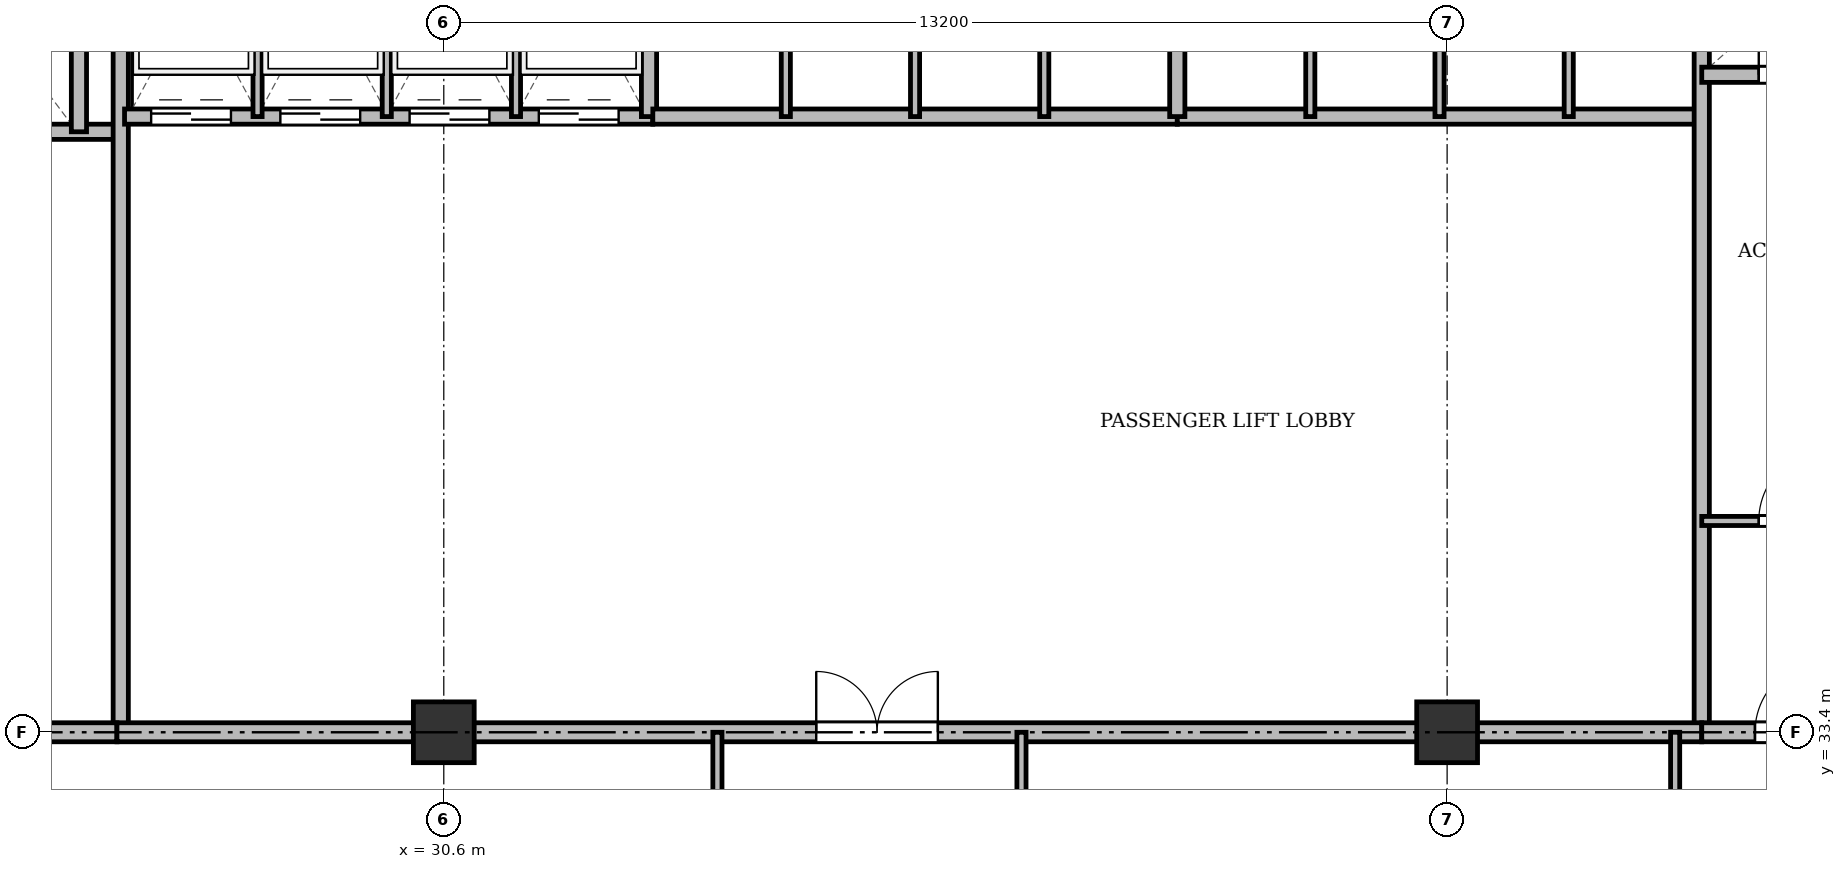
"""IFC4 building model, lengths in metres.
Left out: names, types, materials, properties, quantities, classifications, styles, units other than length and angle.
Written with IfcOpenShell. Run it as: python <this file> out.ifc"""

import sys

from ifc_helpers import new_model, si_unit, direction, frame, frame_2d, origin, origin_2d, place, context, subcontext, project, spatial, rectangle, extrude, source, transform, mapped, element, fill, save


model = new_model("IFC4")
c1 = context("Model", 3, precision=1e-05, world=origin(), true_north=direction((0.0, 1.0)))
c2 = subcontext(c1, "Body", "Model", "MODEL_VIEW")
j1 = project(units=[si_unit("LENGTHUNIT", "METRE"), si_unit("PLANEANGLEUNIT", "RADIAN")], contexts=[c1])
p1 = place(None, origin())
s1 = spatial("IfcSite", under=j1, at=p1, CompositionType="ELEMENT")
p2 = place(p1, origin())
s2 = spatial("IfcBuilding", under=s1, at=p2, CompositionType="ELEMENT")
p3 = place(p2, frame((0.0, 0.0, 85.3)))
s3 = spatial("IfcBuildingStorey", under=s2, at=p3, CompositionType="ELEMENT", Elevation=85.3)
m1 = source(origin(), c2, "Body", "SweptSolid", [
    extrude(rectangle(XDim=0.8, YDim=0.8, at=origin_2d()), origin(), (0.0, 0.0, 1.0), 3.6),
])
for number, where, z_axis, x_axis in (
    (1, (30.6, 33.4, 0.0), (0.0, 0.0, 1.0), (1.0, 0.0, 0.0)),
    (2, (43.8, 33.4, 0.0), (0.0, 0.0, 1.0), (1.0, 0.0, 0.0)),
):
    element("IfcColumn", number, at=place(p3, frame(where, z_axis=z_axis, x_axis=x_axis)), inside=s3, PredefinedType="COLUMN", context=c2, shape_type="MappedRepresentation", body=[
        mapped(m1, transform((0.0, 0.0, 0.0), x_axis=(1.0, 0.0, 0.0), y_axis=(0.0, 1.0, 0.0), z_axis=(0.0, 0.0, 1.0), scale=1.0)),
    ])
p4 = place(p3, frame((19.55, 41.3, 0.0), z_axis=(0.0, 0.0, 1.0), x_axis=(1.0, 0.0, 0.0)))
e3 = element("IfcWall", 3, at=p4, inside=s3, PredefinedType="SOLIDWALL", context=c2, shape_type="SweptSolid", body=[
    extrude(rectangle(XDim=6.75, YDim=0.2, at=frame_2d((3.375, 0.0))), origin(), (0.0, 0.0, 1.0), 3.34),
])
p5 = place(p4, frame((1.7, 0.0, 0.0)))
e4 = element("IfcOpeningElement", 4, at=p5, cuts=e3, PredefinedType="OPENING", context=c2, shape_type="SweptSolid", body=[
    extrude(rectangle(XDim=1.1, YDim=2.15, at=frame_2d((0.55, 1.075))), frame((0.0, 0.11, 0.0), z_axis=(0.0, -1.0, 0.0), x_axis=(1.0, 0.0, 0.0)), (0.0, 0.0, 1.0), 0.22),
])
p6 = place(p4, frame((4.4, 0.0, 0.0)))
e5 = element("IfcOpeningElement", 5, at=p6, cuts=e3, PredefinedType="OPENING", context=c2, shape_type="SweptSolid", body=[
    extrude(rectangle(XDim=1.1, YDim=2.15, at=frame_2d((0.55, 1.075))), frame((0.0, 0.11, 0.0), z_axis=(0.0, -1.0, 0.0), x_axis=(1.0, 0.0, 0.0)), (0.0, 0.0, 1.0), 0.22),
])
p7 = place(p3, frame((25.8, 41.3, 0.0), z_axis=(0.0, 0.0, 1.0), x_axis=(0.0, 1.0, 0.0)))
e6 = element("IfcWall", 6, at=p7, inside=s3, PredefinedType="SOLIDWALL", context=c2, shape_type="SweptSolid", body=[
    extrude(rectangle(XDim=3.4, YDim=0.2, at=frame_2d((1.7, 0.0))), origin(), (0.0, 0.0, 1.0), 3.34),
])
p8 = place(p3, frame((26.35, 33.4, 0.0), z_axis=(0.0, 0.0, 1.0), x_axis=(0.0, 1.0, 0.0)))
e7 = element("IfcWall", 7, at=p8, inside=s3, PredefinedType="SOLIDWALL", context=c2, shape_type="SweptSolid", body=[
    extrude(rectangle(XDim=11.3, YDim=0.2, at=frame_2d((5.65, 0.0))), origin(), (0.0, 0.0, 1.0), 2.752),
])
p9 = place(p3, frame((19.5, 33.4, 0.0), z_axis=(0.0, 0.0, 1.0), x_axis=(1.0, 0.0, 0.0)))
e8 = element("IfcWall", 8, at=p9, inside=s3, PredefinedType="PARTITIONING", context=c2, shape_type="SweptSolid", body=[
    extrude(rectangle(XDim=6.8, YDim=0.25, at=frame_2d((3.4, 0.0))), origin(), (0.0, 0.0, 1.0), 2.752),
])
p10 = place(p9, frame((0.75, 0.0, 0.0)))
e9 = element("IfcOpeningElement", 9, at=p10, cuts=e8, PredefinedType="OPENING", context=c2, shape_type="SweptSolid", body=[
    extrude(rectangle(XDim=1.6, YDim=2.2, at=frame_2d((0.8, 1.1))), frame((0.0, 0.135, 0.0), z_axis=(0.0, -1.0, 0.0), x_axis=(1.0, 0.0, 0.0)), (0.0, 0.0, 1.0), 0.27),
])
p11 = place(p3, frame((26.4, 41.5, 0.0), z_axis=(0.0, 0.0, 1.0), x_axis=(1.0, 0.0, 0.0)))
e10 = element("IfcWall", 10, at=p11, inside=s3, PredefinedType="SOLIDWALL", context=c2, shape_type="SweptSolid", body=[
    extrude(rectangle(XDim=6.95, YDim=0.2, at=frame_2d((3.475, 0.0))), origin(), (0.0, 0.0, 1.0), 3.34),
])
p12 = place(p11, frame((0.35, 0.0, 0.0)))
e11 = element("IfcOpeningElement", 11, at=p12, cuts=e10, PredefinedType="OPENING", context=c2, shape_type="SweptSolid", body=[
    extrude(rectangle(XDim=1.05, YDim=2.15, at=frame_2d((0.525, 1.075))), frame((0.0, 0.11, 0.0), z_axis=(0.0, -1.0, 0.0), x_axis=(1.0, 0.0, 0.0)), (0.0, 0.0, 1.0), 0.22),
])
p13 = place(p11, frame((2.05, 0.0, 0.0)))
e12 = element("IfcOpeningElement", 12, at=p13, cuts=e10, PredefinedType="OPENING", context=c2, shape_type="SweptSolid", body=[
    extrude(rectangle(XDim=1.05, YDim=2.15, at=frame_2d((0.525, 1.075))), frame((0.0, 0.11, 0.0), z_axis=(0.0, -1.0, 0.0), x_axis=(1.0, 0.0, 0.0)), (0.0, 0.0, 1.0), 0.22),
])
p14 = place(p11, frame((3.75, 0.0, 0.0)))
e13 = element("IfcOpeningElement", 13, at=p14, cuts=e10, PredefinedType="OPENING", context=c2, shape_type="SweptSolid", body=[
    extrude(rectangle(XDim=1.05, YDim=2.15, at=frame_2d((0.525, 1.075))), frame((0.0, 0.11, 0.0), z_axis=(0.0, -1.0, 0.0), x_axis=(1.0, 0.0, 0.0)), (0.0, 0.0, 1.0), 0.22),
])
p15 = place(p11, frame((5.45, 0.0, 0.0)))
e14 = element("IfcOpeningElement", 14, at=p15, cuts=e10, PredefinedType="OPENING", context=c2, shape_type="SweptSolid", body=[
    extrude(rectangle(XDim=1.05, YDim=2.15, at=frame_2d((0.525, 1.075))), frame((0.0, 0.11, 0.0), z_axis=(0.0, -1.0, 0.0), x_axis=(1.0, 0.0, 0.0)), (0.0, 0.0, 1.0), 0.22),
])
p16 = place(p3, frame((33.3, 41.5, 0.0), z_axis=(0.0, 0.0, 1.0), x_axis=(0.0, 1.0, 0.0)))
e15 = element("IfcWall", 15, at=p16, inside=s3, PredefinedType="SOLIDWALL", context=c2, shape_type="SweptSolid", body=[
    extrude(rectangle(XDim=3.2, YDim=0.2, at=frame_2d((1.6, 0.0))), origin(), (0.0, 0.0, 1.0), 3.34),
])
for number, where, z_axis, x_axis in (
    (16, (28.15, 41.5, 0.0), (0.0, 0.0, 1.0), (0.0, 1.0, 0.0)),
    (17, (29.85, 41.5, 0.0), (0.0, 0.0, 1.0), (0.0, 1.0, 0.0)),
    (18, (31.55, 41.5, 0.0), (0.0, 0.0, 1.0), (0.0, 1.0, 0.0)),
):
    element("IfcWall", number, at=place(p3, frame(where, z_axis=z_axis, x_axis=x_axis)), inside=s3, PredefinedType="PARTITIONING", context=c2, shape_type="SweptSolid", body=[
        extrude(rectangle(XDim=3.2, YDim=0.12, at=frame_2d((1.6, 0.0))), origin(), (0.0, 0.0, 1.0), 3.34),
    ])
p17 = place(p3, frame((33.35, 41.5, 0.0), z_axis=(0.0, 0.0, 1.0), x_axis=(1.0, 0.0, 0.0)))
e19 = element("IfcWall", 19, at=p17, inside=s3, PredefinedType="SOLIDWALL", context=c2, shape_type="SweptSolid", body=[
    extrude(rectangle(XDim=6.9, YDim=0.2, at=frame_2d((3.45, 0.0))), origin(), (0.0, 0.0, 1.0), 3.34),
])
for number, where, z_axis, x_axis in (
    (20, (35.1, 41.5, 0.0), (0.0, 0.0, 1.0), (0.0, 1.0, 0.0)),
    (21, (36.8, 41.5, 0.0), (0.0, 0.0, 1.0), (0.0, 1.0, 0.0)),
    (22, (38.5, 41.5, 0.0), (0.0, 0.0, 1.0), (0.0, 1.0, 0.0)),
):
    element("IfcWall", number, at=place(p3, frame(where, z_axis=z_axis, x_axis=x_axis)), inside=s3, PredefinedType="PARTITIONING", context=c2, shape_type="SweptSolid", body=[
        extrude(rectangle(XDim=3.2, YDim=0.12, at=frame_2d((1.6, 0.0))), origin(), (0.0, 0.0, 1.0), 3.34),
    ])
p18 = place(p3, frame((40.25, 41.5, 0.0), z_axis=(0.0, 0.0, 1.0), x_axis=(1.0, 0.0, 0.0)))
e23 = element("IfcWall", 23, at=p18, inside=s3, PredefinedType="SOLIDWALL", context=c2, shape_type="SweptSolid", body=[
    extrude(rectangle(XDim=6.9, YDim=0.2, at=frame_2d((3.45, 0.0))), origin(), (0.0, 0.0, 1.0), 2.84),
])
p19 = place(p3, frame((40.25, 41.5, 0.0), z_axis=(0.0, 0.0, 1.0), x_axis=(0.0, 1.0, 0.0)))
e24 = element("IfcWall", 24, at=p19, inside=s3, PredefinedType="SOLIDWALL", context=c2, shape_type="SweptSolid", body=[
    extrude(rectangle(XDim=3.2, YDim=0.2, at=frame_2d((1.6, 0.0))), origin(), (0.0, 0.0, 1.0), 3.34),
])
p20 = place(p3, frame((42.0, 41.5, 0.0), z_axis=(0.0, 0.0, 1.0), x_axis=(0.0, 1.0, 0.0)))
e25 = element("IfcWall", 25, at=p20, inside=s3, PredefinedType="PARTITIONING", context=c2, shape_type="SweptSolid", body=[
    extrude(rectangle(XDim=3.2, YDim=0.12, at=frame_2d((1.6, 0.0))), origin(), (0.0, 0.0, 1.0), 3.34),
])
p21 = place(p3, frame((43.7, 41.5, 0.0), z_axis=(0.0, 0.0, 1.0), x_axis=(0.0, 1.0, 0.0)))
e26 = element("IfcWall", 26, at=p21, inside=s3, PredefinedType="PARTITIONING", context=c2, shape_type="SweptSolid", body=[
    extrude(rectangle(XDim=3.2, YDim=0.12, at=frame_2d((1.6, 0.0))), origin(), (0.0, 0.0, 1.0), 2.84),
])
p22 = place(p3, frame((45.4, 41.5, 0.0), z_axis=(0.0, 0.0, 1.0), x_axis=(0.0, 1.0, 0.0)))
e27 = element("IfcWall", 27, at=p22, inside=s3, PredefinedType="PARTITIONING", context=c2, shape_type="SweptSolid", body=[
    extrude(rectangle(XDim=3.2, YDim=0.12, at=frame_2d((1.6, 0.0))), origin(), (0.0, 0.0, 1.0), 3.34),
])
p23 = place(p3, frame((47.15, 33.4, 0.0), z_axis=(0.0, 0.0, 1.0), x_axis=(0.0, 1.0, 0.0)))
e28 = element("IfcWall", 28, at=p23, inside=s3, PredefinedType="SOLIDWALL", context=c2, shape_type="SweptSolid", body=[
    extrude(rectangle(XDim=11.3, YDim=0.2, at=frame_2d((5.65, 0.0))), origin(), (0.0, 0.0, 1.0), 2.752),
])
p24 = place(p3, frame((26.3, 33.4, 0.0), z_axis=(0.0, 0.0, 1.0), x_axis=(1.0, 0.0, 0.0)))
e29 = element("IfcWall", 29, at=p24, inside=s3, PredefinedType="PARTITIONING", context=c2, shape_type="SweptSolid", body=[
    extrude(rectangle(XDim=20.85, YDim=0.25, at=frame_2d((10.425, 0.0))), origin(), (0.0, 0.0, 1.0), 2.752),
])
p25 = place(p24, frame((9.2, 0.0, 0.0)))
e30 = element("IfcOpeningElement", 30, at=p25, cuts=e29, PredefinedType="OPENING", context=c2, shape_type="SweptSolid", body=[
    extrude(rectangle(XDim=1.6, YDim=2.2, at=frame_2d((0.8, 1.1))), frame((0.0, 0.135, 0.0), z_axis=(0.0, -1.0, 0.0), x_axis=(1.0, 0.0, 0.0)), (0.0, 0.0, 1.0), 0.27),
])
p26 = place(p3, frame((47.15, 42.05, 0.0), z_axis=(0.0, 0.0, 1.0), x_axis=(1.0, 0.0, 0.0)))
e31 = element("IfcWall", 31, at=p26, inside=s3, PredefinedType="SOLIDWALL", context=c2, shape_type="SweptSolid", body=[
    extrude(rectangle(XDim=7.85, YDim=0.2, at=frame_2d((3.925, 0.0))), origin(), (0.0, 0.0, 1.0), 2.84),
])
p27 = place(p26, frame((0.75, 0.0, 0.0)))
e32 = element("IfcOpeningElement", 32, at=p27, cuts=e31, PredefinedType="OPENING", context=c2, shape_type="SweptSolid", body=[
    extrude(rectangle(XDim=0.9, YDim=2.1, at=frame_2d((0.45, 1.05))), frame((0.0, 0.11, 0.0), z_axis=(0.0, -1.0, 0.0), x_axis=(1.0, 0.0, 0.0)), (0.0, 0.0, 1.0), 0.22),
])
p28 = place(p26, frame((3.85, 0.0, 0.0)))
e33 = element("IfcOpeningElement", 33, at=p28, cuts=e31, PredefinedType="OPENING", context=c2, shape_type="SweptSolid", body=[
    extrude(rectangle(XDim=0.9, YDim=2.1, at=frame_2d((0.45, 1.05))), frame((0.0, 0.11, 0.0), z_axis=(0.0, -1.0, 0.0), x_axis=(1.0, 0.0, 0.0)), (0.0, 0.0, 1.0), 0.22),
])
p29 = place(p3, frame((47.15, 36.18, 0.0), z_axis=(0.0, 0.0, 1.0), x_axis=(1.0, 0.0, 0.0)))
e34 = element("IfcWall", 34, at=p29, inside=s3, PredefinedType="PARTITIONING", context=c2, shape_type="SweptSolid", body=[
    extrude(rectangle(XDim=5.3, YDim=0.12, at=frame_2d((2.65, 0.0))), origin(), (0.0, 0.0, 1.0), 2.84),
])
p30 = place(p29, frame((0.75, 0.0, 0.0)))
e35 = element("IfcOpeningElement", 35, at=p30, cuts=e34, PredefinedType="OPENING", context=c2, shape_type="SweptSolid", body=[
    extrude(rectangle(XDim=0.95, YDim=2.15, at=frame_2d((0.475, 1.075))), frame((0.0, 0.07, 0.0), z_axis=(0.0, -1.0, 0.0), x_axis=(1.0, 0.0, 0.0)), (0.0, 0.0, 1.0), 0.14),
])
p31 = place(p29, frame((3.45, 0.0, 0.0)))
e36 = element("IfcOpeningElement", 36, at=p31, cuts=e34, PredefinedType="OPENING", context=c2, shape_type="SweptSolid", body=[
    extrude(rectangle(XDim=0.95, YDim=2.15, at=frame_2d((0.475, 1.075))), frame((0.0, 0.07, 0.0), z_axis=(0.0, -1.0, 0.0), x_axis=(1.0, 0.0, 0.0)), (0.0, 0.0, 1.0), 0.14),
])
p32 = place(p3, frame((47.15, 33.4, 0.0), z_axis=(0.0, 0.0, 1.0), x_axis=(1.0, 0.0, 0.0)))
e37 = element("IfcWall", 37, at=p32, inside=s3, PredefinedType="PARTITIONING", context=c2, shape_type="SweptSolid", body=[
    extrude(rectangle(XDim=11.15, YDim=0.25, at=frame_2d((5.575, 0.0))), origin(), (0.0, 0.0, 1.0), 2.752),
])
p33 = place(p32, frame((0.7, 0.0, 0.0)))
e38 = element("IfcOpeningElement", 38, at=p33, cuts=e37, PredefinedType="OPENING", context=c2, shape_type="SweptSolid", body=[
    extrude(rectangle(XDim=0.95, YDim=2.15, at=frame_2d((0.475, 1.075))), frame((0.0, 0.135, 0.0), z_axis=(0.0, -1.0, 0.0), x_axis=(1.0, 0.0, 0.0)), (0.0, 0.0, 1.0), 0.27),
])
p34 = place(p32, frame((6.0, 0.0, 0.0)))
e39 = element("IfcOpeningElement", 39, at=p34, cuts=e37, PredefinedType="OPENING", context=c2, shape_type="SweptSolid", body=[
    extrude(rectangle(XDim=1.2, YDim=2.15, at=frame_2d((0.6, 1.075))), frame((0.0, 0.135, 0.0), z_axis=(0.0, -1.0, 0.0), x_axis=(1.0, 0.0, 0.0)), (0.0, 0.0, 1.0), 0.27),
])
for number, where, z_axis, x_axis in (
    (40, (34.2, 29.8, 0.0), (0.0, 0.0, 1.0), (0.0, 1.0, 0.0)),
    (41, (38.2, 29.8, 0.0), (0.0, 0.0, 1.0), (0.0, 1.0, 0.0)),
    (42, (46.8, 29.8, 0.0), (0.0, 0.0, 1.0), (0.0, 1.0, 0.0)),
):
    element("IfcWall", number, at=place(p3, frame(where, z_axis=z_axis, x_axis=x_axis)), inside=s3, PredefinedType="PARTITIONING", context=c2, shape_type="SweptSolid", body=[
        extrude(rectangle(XDim=3.6, YDim=0.12, at=frame_2d((1.8, 0.0))), origin(), (0.0, 0.0, 1.0), 2.752),
    ])
m2 = source(origin(), c2, "Body", "SweptSolid", [
    extrude(rectangle(XDim=1.05, YDim=2.15, at=frame_2d((0.525, 1.075))), frame((0.0, 0.025, 0.0), z_axis=(0.0, -1.0, 0.0), x_axis=(1.0, 0.0, 0.0)), (0.0, 0.0, 1.0), 0.05),
])
p35 = place(p12, origin())
e43 = element("IfcDoor", 43, at=p35, inside=s3, OperationType="DOUBLE_DOOR_SLIDING", PredefinedType="DOOR", context=c2, shape_type="MappedRepresentation", body=[
    mapped(m2, transform((0.0, 0.0, 0.0), x_axis=(1.0, 0.0, 0.0), y_axis=(0.0, 1.0, 0.0), z_axis=(0.0, 0.0, 1.0), scale=1.0)),
])
fill(e11, e43)
p36 = place(p13, origin())
e44 = element("IfcDoor", 44, at=p36, inside=s3, OperationType="DOUBLE_DOOR_SLIDING", PredefinedType="DOOR", context=c2, shape_type="MappedRepresentation", body=[
    mapped(m2, transform((0.0, 0.0, 0.0), x_axis=(1.0, 0.0, 0.0), y_axis=(0.0, 1.0, 0.0), z_axis=(0.0, 0.0, 1.0), scale=1.0)),
])
fill(e12, e44)
p37 = place(p14, origin())
e45 = element("IfcDoor", 45, at=p37, inside=s3, OperationType="DOUBLE_DOOR_SLIDING", PredefinedType="DOOR", context=c2, shape_type="MappedRepresentation", body=[
    mapped(m2, transform((0.0, 0.0, 0.0), x_axis=(1.0, 0.0, 0.0), y_axis=(0.0, 1.0, 0.0), z_axis=(0.0, 0.0, 1.0), scale=1.0)),
])
fill(e13, e45)
p38 = place(p15, origin())
e46 = element("IfcDoor", 46, at=p38, inside=s3, OperationType="DOUBLE_DOOR_SLIDING", PredefinedType="DOOR", context=c2, shape_type="MappedRepresentation", body=[
    mapped(m2, transform((0.0, 0.0, 0.0), x_axis=(1.0, 0.0, 0.0), y_axis=(0.0, 1.0, 0.0), z_axis=(0.0, 0.0, 1.0), scale=1.0)),
])
fill(e14, e46)
m3 = source(origin(), c2, "Body", "SweptSolid", [
    extrude(rectangle(XDim=1.6, YDim=2.2, at=frame_2d((0.8, 1.1))), frame((0.0, 0.025, 0.0), z_axis=(0.0, -1.0, 0.0), x_axis=(1.0, 0.0, 0.0)), (0.0, 0.0, 1.0), 0.05),
])
p39 = place(p25, origin())
e47 = element("IfcDoor", 47, at=p39, inside=s3, OperationType="DOUBLE_DOOR_SINGLE_SWING", PredefinedType="DOOR", context=c2, shape_type="MappedRepresentation", body=[
    mapped(m3, transform((0.0, 0.0, 0.0), x_axis=(1.0, 0.0, 0.0), y_axis=(0.0, 1.0, 0.0), z_axis=(0.0, 0.0, 1.0), scale=1.0)),
])
fill(e30, e47)
m4 = source(origin(), c2, "Body", "SweptSolid", [
    extrude(rectangle(XDim=0.9, YDim=2.1, at=frame_2d((0.45, 1.05))), frame((0.0, 0.025, 0.0), z_axis=(0.0, -1.0, 0.0), x_axis=(1.0, 0.0, 0.0)), (0.0, 0.0, 1.0), 0.05),
])
p40 = place(p27, origin())
e48 = element("IfcDoor", 48, at=p40, inside=s3, OperationType="SINGLE_SWING_LEFT", PredefinedType="DOOR", context=c2, shape_type="MappedRepresentation", body=[
    mapped(m4, transform((0.0, 0.0, 0.0), x_axis=(1.0, 0.0, 0.0), y_axis=(0.0, 1.0, 0.0), z_axis=(0.0, 0.0, 1.0), scale=1.0)),
])
fill(e32, e48)
m5 = source(origin(), c2, "Body", "SweptSolid", [
    extrude(rectangle(XDim=0.95, YDim=2.15, at=frame_2d((0.475, 1.075))), frame((0.0, 0.025, 0.0), z_axis=(0.0, -1.0, 0.0), x_axis=(1.0, 0.0, 0.0)), (0.0, 0.0, 1.0), 0.05),
])
p41 = place(p30, origin())
e49 = element("IfcDoor", 49, at=p41, inside=s3, OperationType="SINGLE_SWING_RIGHT", PredefinedType="DOOR", context=c2, shape_type="MappedRepresentation", body=[
    mapped(m5, transform((0.0, 0.0, 0.0), x_axis=(1.0, 0.0, 0.0), y_axis=(0.0, 1.0, 0.0), z_axis=(0.0, 0.0, 1.0), scale=1.0)),
])
fill(e35, e49)
p42 = place(p33, origin())
e50 = element("IfcDoor", 50, at=p42, inside=s3, OperationType="SINGLE_SWING_RIGHT", PredefinedType="DOOR", context=c2, shape_type="MappedRepresentation", body=[
    mapped(m5, transform((0.0, 0.0, 0.0), x_axis=(1.0, 0.0, 0.0), y_axis=(0.0, 1.0, 0.0), z_axis=(0.0, 0.0, 1.0), scale=1.0)),
])
fill(e38, e50)
save(model, sys.argv[1])
